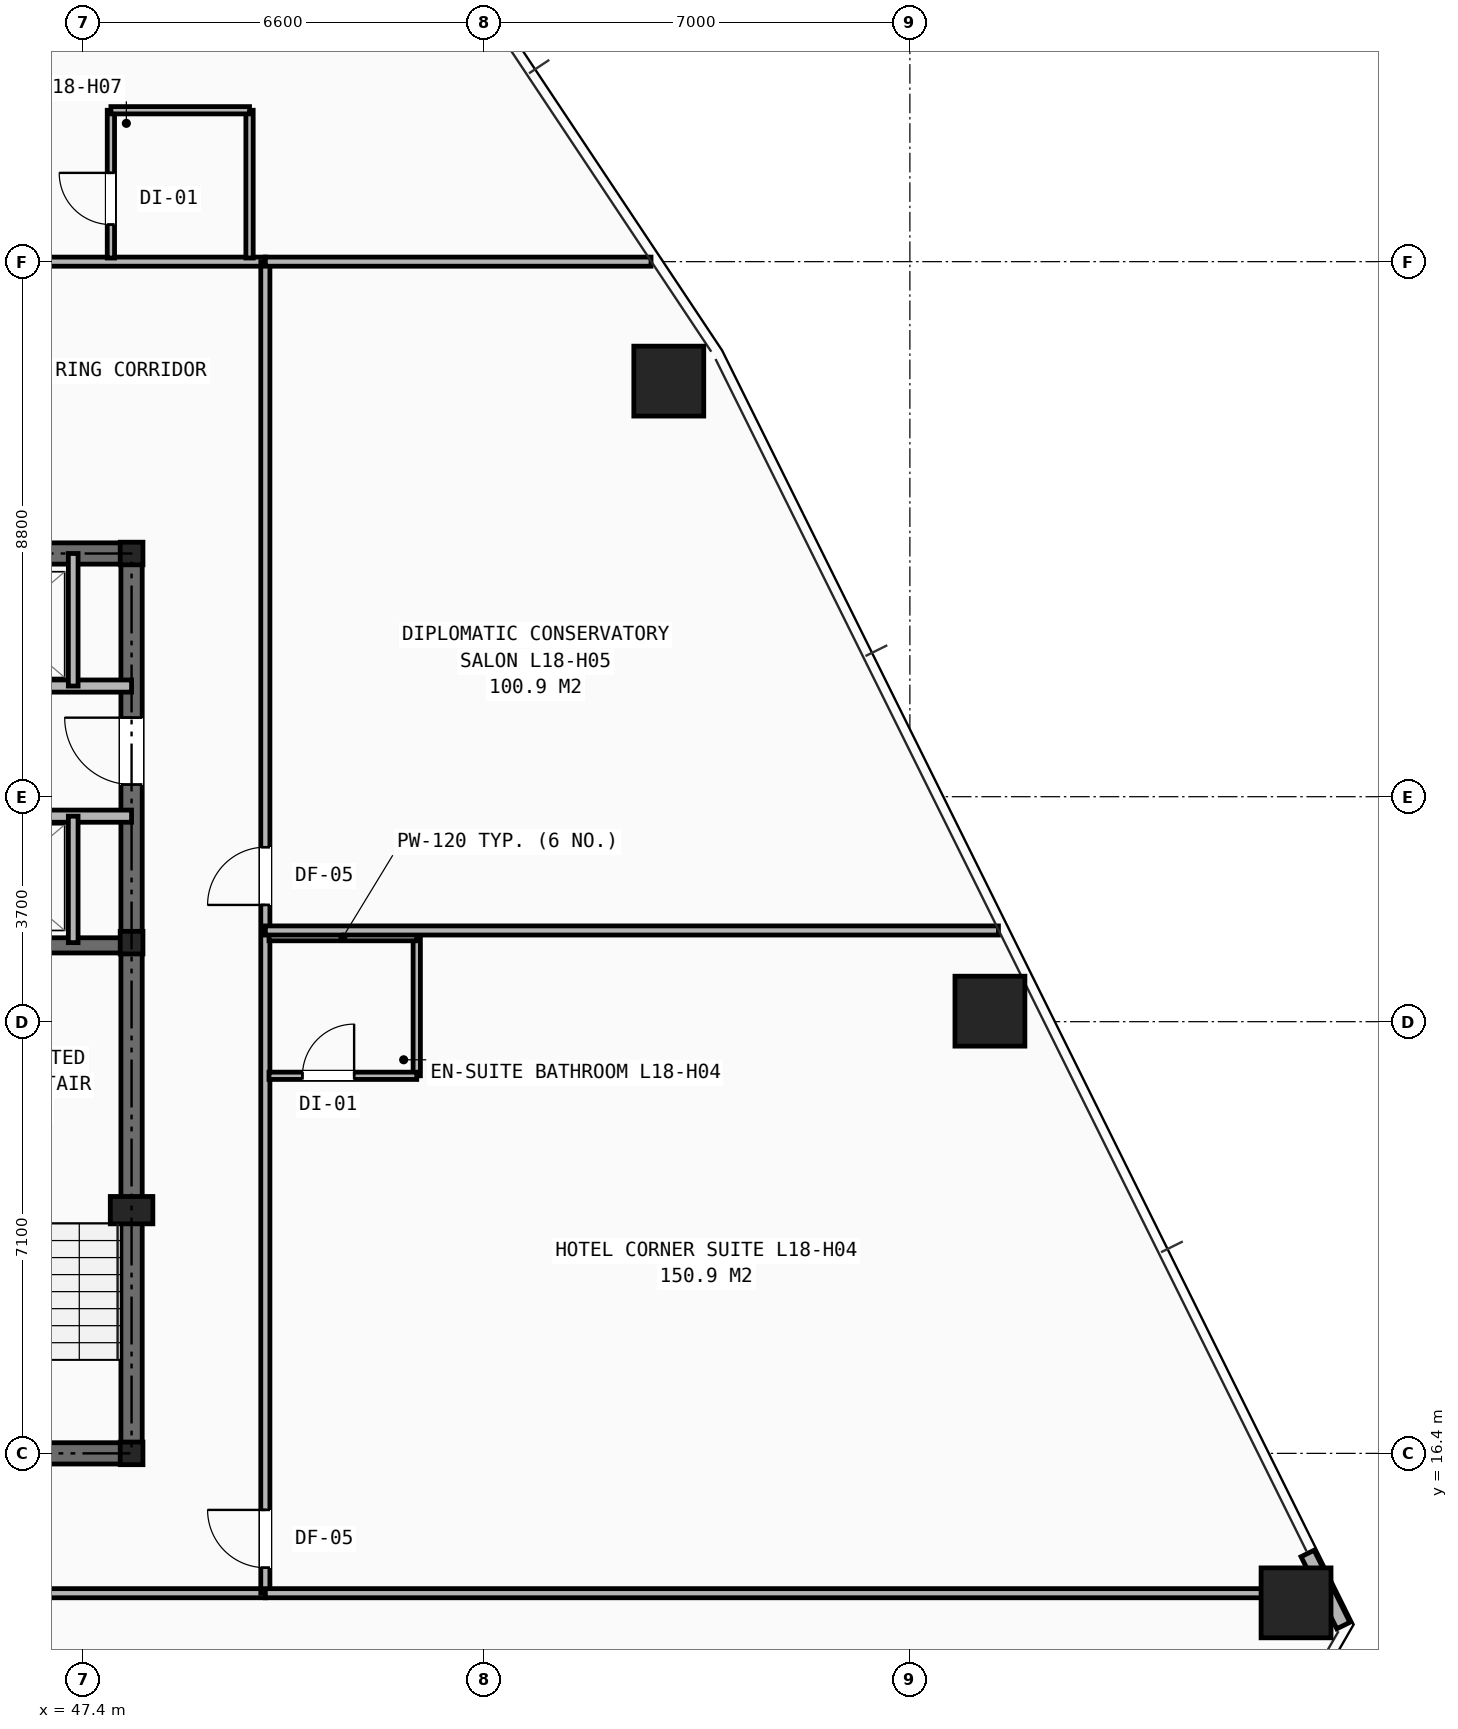
"""IFC4 building model, lengths in metres.
Left out: names, types, materials, properties, quantities, classifications, styles, units other than length and angle.
Written with IfcOpenShell. Run it as: python <this file> out.ifc"""

import sys

from ifc_helpers import new_model, si_unit, direction, frame, frame_2d, origin, origin_2d, place, context, subcontext, project, spatial, rectangle, hollow_rectangle, i_section, extrude, element, fill, save


model = new_model("IFC4")
c1 = context("Model", 3, precision=1e-05, world=origin(), true_north=direction((0.0, 1.0)))
c2 = subcontext(c1, "Body", "Model", "MODEL_VIEW")
j1 = project(units=[si_unit("LENGTHUNIT", "METRE"), si_unit("PLANEANGLEUNIT", "RADIAN")], contexts=[c1])
p1 = place(None, origin())
s1 = spatial("IfcSite", under=j1, at=p1, CompositionType="ELEMENT")
p2 = place(p1, origin())
s2 = spatial("IfcBuilding", under=s1, at=p2, CompositionType="ELEMENT")
p3 = place(p2, frame((0.0, 0.0, 65.6)))
s3 = spatial("IfcBuildingStorey", under=s2, at=p3, CompositionType="ELEMENT", Elevation=65.6)
for number, where, z_axis, x_axis in (
    (1, (48.2, 16.4, 0.0), (0.0, 0.0, 1.0), (1.0, 0.0, 0.0)),
    (2, (48.2, 24.8, 0.0), (0.0, 0.0, 1.0), (1.0, 0.0, 0.0)),
    (3, (48.2, 31.2, 0.0), (0.0, 0.0, 1.0), (1.0, 0.0, 0.0)),
):
    element("IfcColumn", number, at=place(p3, frame(where, z_axis=z_axis, x_axis=x_axis)), inside=s3, PredefinedType="COLUMN", context=c2, shape_type="SweptSolid", body=[
        extrude(i_section(OverallWidth=0.374, OverallDepth=0.372, WebThickness=0.016, FlangeThickness=0.026, at=origin_2d()), origin(), (0.0, 0.0, 1.0), 3.2),
    ])
p4 = place(p3, frame((48.2, 20.4, 0.0), z_axis=(0.0, 0.0, 1.0), x_axis=(1.0, 0.0, 0.0)))
e4 = element("IfcColumn", 4, at=p4, inside=s3, PredefinedType="PILASTER", context=c2, shape_type="SweptSolid", body=[
    extrude(rectangle(XDim=0.7, YDim=0.45, at=origin_2d()), origin(), (0.0, 0.0, 1.0), 3.2),
])
for number, where, z_axis, x_axis in (
    (5, (67.351, 13.941, 0.0), (0.0, 0.0, 1.0), (1.0, 0.0, 0.0)),
    (6, (62.316, 23.673, 0.0), (0.0, 0.0, 1.0), (1.0, 0.0, 0.0)),
    (7, (57.035, 34.035, 0.0), (0.0, 0.0, 1.0), (1.0, 0.0, 0.0)),
):
    element("IfcColumn", number, at=place(p3, frame(where, z_axis=z_axis, x_axis=x_axis)), inside=s3, PredefinedType="COLUMN", context=c2, shape_type="SweptSolid", body=[
        extrude(hollow_rectangle(XDim=1.15, YDim=1.15, WallThickness=0.075, at=origin_2d()), origin(), (0.0, 0.0, 1.0), 3.2),
    ])
p5 = place(p3, frame((68.129, 13.568, 0.0), z_axis=(0.0, 0.0, 1.0), x_axis=(-0.444037765369, 0.896008070793, 0.0)))
e8 = element("IfcWall", 8, at=p5, inside=s3, PredefinedType="SHEAR", context=c2, shape_type="SweptSolid", body=[
    extrude(rectangle(XDim=1.323, YDim=0.24, at=frame_2d((0.662, 0.0))), origin(), (0.0, 0.0, 1.0), 2.183),
])
p6 = place(p3, frame((31.8, 16.4, 0.0), z_axis=(0.0, 0.0, 1.0), x_axis=(1.0, 0.0, 0.0)))
e9 = element("IfcWall", 9, at=p6, inside=s3, PredefinedType="SHEAR", context=c2, shape_type="SweptSolid", body=[
    extrude(rectangle(XDim=16.4, YDim=0.35, at=frame_2d((8.2, 0.0))), origin(), (0.0, 0.0, 1.0), 2.9),
])
p7 = place(p6, frame((7.75, 0.0, 0.0)))
e10 = element("IfcOpeningElement", 10, at=p7, cuts=e9, PredefinedType="OPENING", context=c2, shape_type="SweptSolid", body=[
    extrude(rectangle(XDim=0.9, YDim=2.1, at=frame_2d((0.45, 1.05))), frame((0.0, 0.185, 0.0), z_axis=(0.0, -1.0, 0.0), x_axis=(1.0, 0.0, 0.0)), (0.0, 0.0, 1.0), 0.37),
])
p8 = place(p6, frame((4.2, 0.0, 0.0)))
e11 = element("IfcOpeningElement", 11, at=p8, cuts=e9, PredefinedType="OPENING", context=c2, shape_type="SweptSolid", body=[
    extrude(rectangle(XDim=0.95, YDim=2.1, at=frame_2d((0.475, 1.05))), frame((0.0, 0.185, 0.0), z_axis=(0.0, -1.0, 0.0), x_axis=(1.0, 0.0, 0.0)), (0.0, 0.0, 1.0), 0.37),
])
p9 = place(p6, frame((10.6, 0.0, 0.0)))
e12 = element("IfcOpeningElement", 12, at=p9, cuts=e9, PredefinedType="OPENING", context=c2, shape_type="SweptSolid", body=[
    extrude(rectangle(XDim=0.95, YDim=2.1, at=frame_2d((0.475, 1.05))), frame((0.0, 0.185, 0.0), z_axis=(0.0, -1.0, 0.0), x_axis=(1.0, 0.0, 0.0)), (0.0, 0.0, 1.0), 0.37),
])
p10 = place(p3, frame((31.8, 31.2, 0.0), z_axis=(0.0, 0.0, 1.0), x_axis=(1.0, 0.0, 0.0)))
e13 = element("IfcWall", 13, at=p10, inside=s3, PredefinedType="SHEAR", context=c2, shape_type="SweptSolid", body=[
    extrude(rectangle(XDim=16.4, YDim=0.35, at=frame_2d((8.2, 0.0))), origin(), (0.0, 0.0, 1.0), 2.9),
])
p11 = place(p3, frame((48.2, 16.4, 0.0), z_axis=(0.0, 0.0, 1.0), x_axis=(0.0, 1.0, 0.0)))
e14 = element("IfcWall", 14, at=p11, inside=s3, PredefinedType="SHEAR", context=c2, shape_type="SweptSolid", body=[
    extrude(rectangle(XDim=14.8, YDim=0.35, at=frame_2d((7.4, 0.0))), origin(), (0.0, 0.0, 1.0), 2.9),
])
p12 = place(p11, frame((11.0, 0.0, 0.0)))
e15 = element("IfcOpeningElement", 15, at=p12, cuts=e14, PredefinedType="OPENING", context=c2, shape_type="SweptSolid", body=[
    extrude(rectangle(XDim=1.1, YDim=2.15, at=frame_2d((0.55, 1.075))), frame((0.0, 0.185, 0.0), z_axis=(0.0, -1.0, 0.0), x_axis=(1.0, 0.0, 0.0)), (0.0, 0.0, 1.0), 0.37),
])
p13 = place(p3, frame((44.955, 24.755, 0.0), z_axis=(0.0, 0.0, 1.0), x_axis=(1.0, 0.0, 0.0)))
e16 = element("IfcWall", 16, at=p13, inside=s3, PredefinedType="SHEAR", context=c2, shape_type="SweptSolid", body=[
    extrude(rectangle(XDim=3.245, YDim=0.25, at=frame_2d((1.623, 0.0))), origin(), (0.0, 0.0, 1.0), 2.9),
])
p14 = place(p3, frame((31.8, 29.02, 0.0), z_axis=(0.0, 0.0, 1.0), x_axis=(1.0, 0.0, 0.0)))
e17 = element("IfcWall", 17, at=p14, inside=s3, PredefinedType="SOLIDWALL", context=c2, shape_type="SweptSolid", body=[
    extrude(rectangle(XDim=16.4, YDim=0.2, at=frame_2d((8.2, 0.0))), origin(), (0.0, 0.0, 1.0), 2.351),
])
p15 = place(p14, frame((0.55, 0.0, 0.0)))
e18 = element("IfcOpeningElement", 18, at=p15, cuts=e17, PredefinedType="OPENING", context=c2, shape_type="SweptSolid", body=[
    extrude(rectangle(XDim=0.85, YDim=2.05, at=frame_2d((0.425, 1.025))), frame((0.0, 0.11, 0.0), z_axis=(0.0, -1.0, 0.0), x_axis=(1.0, 0.0, 0.0)), (0.0, 0.0, 1.0), 0.22),
])
p16 = place(p14, frame((2.55, 0.0, 0.0)))
e19 = element("IfcOpeningElement", 19, at=p16, cuts=e17, PredefinedType="OPENING", context=c2, shape_type="SweptSolid", body=[
    extrude(rectangle(XDim=1.1, YDim=2.15, at=frame_2d((0.55, 1.075))), frame((0.0, 0.11, 0.0), z_axis=(0.0, -1.0, 0.0), x_axis=(1.0, 0.0, 0.0)), (0.0, 0.0, 1.0), 0.22),
])
p17 = place(p14, frame((4.71, 0.0, 0.0)))
e20 = element("IfcOpeningElement", 20, at=p17, cuts=e17, PredefinedType="OPENING", context=c2, shape_type="SweptSolid", body=[
    extrude(rectangle(XDim=1.1, YDim=2.15, at=frame_2d((0.55, 1.075))), frame((0.0, 0.11, 0.0), z_axis=(0.0, -1.0, 0.0), x_axis=(1.0, 0.0, 0.0)), (0.0, 0.0, 1.0), 0.22),
])
p18 = place(p14, frame((6.87, 0.0, 0.0)))
e21 = element("IfcOpeningElement", 21, at=p18, cuts=e17, PredefinedType="OPENING", context=c2, shape_type="SweptSolid", body=[
    extrude(rectangle(XDim=1.1, YDim=2.15, at=frame_2d((0.55, 1.075))), frame((0.0, 0.11, 0.0), z_axis=(0.0, -1.0, 0.0), x_axis=(1.0, 0.0, 0.0)), (0.0, 0.0, 1.0), 0.22),
])
p19 = place(p14, frame((9.03, 0.0, 0.0)))
e22 = element("IfcOpeningElement", 22, at=p19, cuts=e17, PredefinedType="OPENING", context=c2, shape_type="SweptSolid", body=[
    extrude(rectangle(XDim=1.1, YDim=2.15, at=frame_2d((0.55, 1.075))), frame((0.0, 0.11, 0.0), z_axis=(0.0, -1.0, 0.0), x_axis=(1.0, 0.0, 0.0)), (0.0, 0.0, 1.0), 0.22),
])
p20 = place(p3, frame((33.82, 26.88, 0.0), z_axis=(0.0, 0.0, 1.0), x_axis=(1.0, 0.0, 0.0)))
e23 = element("IfcWall", 23, at=p20, inside=s3, PredefinedType="SOLIDWALL", context=c2, shape_type="SweptSolid", body=[
    extrude(rectangle(XDim=14.38, YDim=0.2, at=frame_2d((7.19, 0.0))), origin(), (0.0, 0.0, 1.0), 2.351),
])
p21 = place(p3, frame((47.24, 29.02, 0.0), z_axis=(0.0, 0.0, 1.0), x_axis=(0.0, 1.0, 0.0)))
e24 = element("IfcWall", 24, at=p21, inside=s3, PredefinedType="SOLIDWALL", context=c2, shape_type="SweptSolid", body=[
    extrude(rectangle(XDim=2.18, YDim=0.16, at=frame_2d((1.09, 0.0))), origin(), (0.0, 0.0, 1.0), 2.351),
])
p22 = place(p3, frame((47.24, 24.8, 0.0), z_axis=(0.0, 0.0, 1.0), x_axis=(0.0, 1.0, 0.0)))
e25 = element("IfcWall", 25, at=p22, inside=s3, PredefinedType="SOLIDWALL", context=c2, shape_type="SweptSolid", body=[
    extrude(rectangle(XDim=2.08, YDim=0.16, at=frame_2d((1.04, 0.0))), origin(), (0.0, 0.0, 1.0), 2.9),
])
p23 = place(p3, frame((29.6, 14.1, 0.0), z_axis=(0.0, 0.0, 1.0), x_axis=(1.0, 0.0, 0.0)))
e26 = element("IfcWall", 26, at=p23, inside=s3, PredefinedType="PARTITIONING", context=c2, shape_type="SweptSolid", body=[
    extrude(rectangle(XDim=20.8, YDim=0.15, at=frame_2d((10.4, 0.0))), origin(), (0.0, 0.0, 1.0), 2.351),
])
p24 = place(p23, frame((0.57, 0.0, 0.0)))
e27 = element("IfcOpeningElement", 27, at=p24, cuts=e26, PredefinedType="OPENING", context=c2, shape_type="SweptSolid", body=[
    extrude(rectangle(XDim=0.95, YDim=2.1, at=frame_2d((0.475, 1.05))), frame((0.0, 0.085, 0.0), z_axis=(0.0, -1.0, 0.0), x_axis=(1.0, 0.0, 0.0)), (0.0, 0.0, 1.0), 0.17),
])
p25 = place(p23, frame((9.32, 0.0, 0.0)))
e28 = element("IfcOpeningElement", 28, at=p25, cuts=e26, PredefinedType="OPENING", context=c2, shape_type="SweptSolid", body=[
    extrude(rectangle(XDim=0.95, YDim=2.1, at=frame_2d((0.475, 1.05))), frame((0.0, 0.085, 0.0), z_axis=(0.0, -1.0, 0.0), x_axis=(1.0, 0.0, 0.0)), (0.0, 0.0, 1.0), 0.17),
])
p26 = place(p3, frame((40.75, 36.0, 0.0), z_axis=(0.0, 0.0, 1.0), x_axis=(1.0, 0.0, 0.0)))
e29 = element("IfcWall", 29, at=p26, inside=s3, PredefinedType="PARTITIONING", context=c2, shape_type="SweptSolid", body=[
    extrude(rectangle(XDim=9.65, YDim=0.15, at=frame_2d((4.825, 0.0))), origin(), (0.0, 0.0, 1.0), 2.433),
])
p27 = place(p26, frame((0.17, 0.0, 0.0)))
e30 = element("IfcOpeningElement", 30, at=p27, cuts=e29, PredefinedType="OPENING", context=c2, shape_type="SweptSolid", body=[
    extrude(rectangle(XDim=0.95, YDim=2.1, at=frame_2d((0.475, 1.05))), frame((0.0, 0.085, 0.0), z_axis=(0.0, -1.0, 0.0), x_axis=(1.0, 0.0, 0.0)), (0.0, 0.0, 1.0), 0.17),
])
p28 = place(p3, frame((50.4, 14.1, 0.0), z_axis=(0.0, 0.0, 1.0), x_axis=(0.0, 1.0, 0.0)))
e31 = element("IfcWall", 31, at=p28, inside=s3, PredefinedType="PARTITIONING", context=c2, shape_type="SweptSolid", body=[
    extrude(rectangle(XDim=21.9, YDim=0.15, at=frame_2d((10.95, 0.0))), origin(), (0.0, 0.0, 1.0), 2.351),
])
p29 = place(p28, frame((0.42, 0.0, 0.0)))
e32 = element("IfcOpeningElement", 32, at=p29, cuts=e31, PredefinedType="OPENING", context=c2, shape_type="SweptSolid", body=[
    extrude(rectangle(XDim=0.95, YDim=2.1, at=frame_2d((0.475, 1.05))), frame((0.0, 0.085, 0.0), z_axis=(0.0, -1.0, 0.0), x_axis=(1.0, 0.0, 0.0)), (0.0, 0.0, 1.0), 0.17),
])
p30 = place(p28, frame((11.32, 0.0, 0.0)))
e33 = element("IfcOpeningElement", 33, at=p30, cuts=e31, PredefinedType="OPENING", context=c2, shape_type="SweptSolid", body=[
    extrude(rectangle(XDim=0.95, YDim=2.1, at=frame_2d((0.475, 1.05))), frame((0.0, 0.085, 0.0), z_axis=(0.0, -1.0, 0.0), x_axis=(1.0, 0.0, 0.0)), (0.0, 0.0, 1.0), 0.17),
])
p31 = place(p3, frame((50.4, 14.1, 0.0), z_axis=(0.0, 0.0, 1.0), x_axis=(1.0, 0.0, 0.0)))
e34 = element("IfcWall", 34, at=p31, inside=s3, PredefinedType="PARTITIONING", context=c2, shape_type="SweptSolid", body=[
    extrude(rectangle(XDim=17.459, YDim=0.15, at=frame_2d((8.73, 0.0))), origin(), (0.0, 0.0, 1.0), 2.188),
])
p32 = place(p3, frame((50.4, 36.0, 0.0), z_axis=(0.0, 0.0, 1.0), x_axis=(1.0, 0.0, 0.0)))
e35 = element("IfcWall", 35, at=p32, inside=s3, PredefinedType="PARTITIONING", context=c2, shape_type="SweptSolid", body=[
    extrude(rectangle(XDim=6.343, YDim=0.15, at=frame_2d((3.171, 0.0))), origin(), (0.0, 0.0, 1.0), 2.188),
])
p33 = place(p3, frame((52.89, 22.61, 0.0), z_axis=(0.0, 0.0, 1.0), x_axis=(0.0, 1.0, 0.0)))
e36 = element("IfcWall", 36, at=p33, inside=s3, PredefinedType="PARTITIONING", context=c2, shape_type="SweptSolid", body=[
    extrude(rectangle(XDim=2.28, YDim=0.12, at=frame_2d((1.14, 0.0))), origin(), (0.0, 0.0, 1.0), 2.9),
])
p34 = place(p3, frame((50.46, 22.61, 0.0), z_axis=(0.0, 0.0, 1.0), x_axis=(1.0, 0.0, 0.0)))
e37 = element("IfcWall", 37, at=p34, inside=s3, PredefinedType="PARTITIONING", context=c2, shape_type="SweptSolid", body=[
    extrude(rectangle(XDim=2.43, YDim=0.12, at=frame_2d((1.215, 0.0))), origin(), (0.0, 0.0, 1.0), 2.9),
])
p35 = place(p34, frame((0.55, 0.0, 0.0)))
e38 = element("IfcOpeningElement", 38, at=p35, cuts=e37, PredefinedType="OPENING", context=c2, shape_type="SweptSolid", body=[
    extrude(rectangle(XDim=0.85, YDim=2.05, at=frame_2d((0.425, 1.025))), frame((0.0, 0.07, 0.0), z_axis=(0.0, -1.0, 0.0), x_axis=(1.0, 0.0, 0.0)), (0.0, 0.0, 1.0), 0.14),
])
p36 = place(p3, frame((50.46, 24.89, 0.0), z_axis=(0.0, 0.0, 1.0), x_axis=(1.0, 0.0, 0.0)))
e39 = element("IfcWall", 39, at=p36, inside=s3, PredefinedType="PARTITIONING", context=c2, shape_type="SweptSolid", body=[
    extrude(rectangle(XDim=2.43, YDim=0.12, at=frame_2d((1.215, 0.0))), origin(), (0.0, 0.0, 1.0), 2.9),
])
p37 = place(p3, frame((50.4, 25.0, 0.0), z_axis=(0.0, 0.0, 1.0), x_axis=(1.0, 0.0, 0.0)))
e40 = element("IfcWall", 40, at=p37, inside=s3, PredefinedType="PARTITIONING", context=c2, shape_type="SweptSolid", body=[
    extrude(rectangle(XDim=12.056, YDim=0.15, at=frame_2d((6.028, 0.0))), origin(), (0.0, 0.0, 1.0), 2.188),
])
p38 = place(p3, frame((47.86, 36.06, 0.0), z_axis=(0.0, 0.0, 1.0), x_axis=(0.0, 1.0, 0.0)))
e41 = element("IfcWall", 41, at=p38, inside=s3, PredefinedType="PARTITIONING", context=c2, shape_type="SweptSolid", body=[
    extrude(rectangle(XDim=2.43, YDim=0.12, at=frame_2d((1.215, 0.0))), origin(), (0.0, 0.0, 1.0), 2.9),
])
p39 = place(p38, frame((0.55, 0.0, 0.0)))
e42 = element("IfcOpeningElement", 42, at=p39, cuts=e41, PredefinedType="OPENING", context=c2, shape_type="SweptSolid", body=[
    extrude(rectangle(XDim=0.85, YDim=2.05, at=frame_2d((0.425, 1.025))), frame((0.0, 0.07, 0.0), z_axis=(0.0, -1.0, 0.0), x_axis=(1.0, 0.0, 0.0)), (0.0, 0.0, 1.0), 0.14),
])
p40 = place(p3, frame((50.14, 36.06, 0.0), z_axis=(0.0, 0.0, 1.0), x_axis=(0.0, 1.0, 0.0)))
e43 = element("IfcWall", 43, at=p40, inside=s3, PredefinedType="PARTITIONING", context=c2, shape_type="SweptSolid", body=[
    extrude(rectangle(XDim=2.43, YDim=0.12, at=frame_2d((1.215, 0.0))), origin(), (0.0, 0.0, 1.0), 2.433),
])
p41 = place(p3, frame((47.86, 38.49, 0.0), z_axis=(0.0, 0.0, 1.0), x_axis=(1.0, 0.0, 0.0)))
e44 = element("IfcWall", 44, at=p41, inside=s3, PredefinedType="PARTITIONING", context=c2, shape_type="SweptSolid", body=[
    extrude(rectangle(XDim=2.28, YDim=0.12, at=frame_2d((1.14, 0.0))), origin(), (0.0, 0.0, 1.0), 2.433),
])
p42 = place(p12, origin())
e45 = element("IfcDoor", 45, at=p42, inside=s3, OperationType="SINGLE_SWING_RIGHT", PredefinedType="DOOR", context=c2, shape_type="SweptSolid", body=[
    extrude(rectangle(XDim=1.1, YDim=2.15, at=frame_2d((0.55, 1.075))), frame((0.0, 0.025, 0.0), z_axis=(0.0, -1.0, 0.0), x_axis=(1.0, 0.0, 0.0)), (0.0, 0.0, 1.0), 0.05),
])
fill(e15, e45)
p43 = place(p29, origin())
e46 = element("IfcDoor", 46, at=p43, inside=s3, OperationType="SINGLE_SWING_RIGHT", PredefinedType="DOOR", context=c2, shape_type="SweptSolid", body=[
    extrude(rectangle(XDim=0.95, YDim=2.1, at=frame_2d((0.475, 1.05))), frame((0.0, 0.025, 0.0), z_axis=(0.0, -1.0, 0.0), x_axis=(1.0, 0.0, 0.0)), (0.0, 0.0, 1.0), 0.05),
])
fill(e32, e46)
p44 = place(p35, origin())
e47 = element("IfcDoor", 47, at=p44, inside=s3, OperationType="SINGLE_SWING_RIGHT", PredefinedType="DOOR", context=c2, shape_type="SweptSolid", body=[
    extrude(rectangle(XDim=0.85, YDim=2.05, at=frame_2d((0.425, 1.025))), frame((0.0, 0.025, 0.0), z_axis=(0.0, -1.0, 0.0), x_axis=(1.0, 0.0, 0.0)), (0.0, 0.0, 1.0), 0.05),
])
fill(e38, e47)
p45 = place(p30, origin())
e48 = element("IfcDoor", 48, at=p45, inside=s3, OperationType="SINGLE_SWING_LEFT", PredefinedType="DOOR", context=c2, shape_type="SweptSolid", body=[
    extrude(rectangle(XDim=0.95, YDim=2.1, at=frame_2d((0.475, 1.05))), frame((0.0, 0.025, 0.0), z_axis=(0.0, -1.0, 0.0), x_axis=(1.0, 0.0, 0.0)), (0.0, 0.0, 1.0), 0.05),
])
fill(e33, e48)
p46 = place(p39, origin())
e49 = element("IfcDoor", 49, at=p46, inside=s3, OperationType="SINGLE_SWING_RIGHT", PredefinedType="DOOR", context=c2, shape_type="SweptSolid", body=[
    extrude(rectangle(XDim=0.85, YDim=2.05, at=frame_2d((0.425, 1.025))), frame((0.0, 0.025, 0.0), z_axis=(0.0, -1.0, 0.0), x_axis=(1.0, 0.0, 0.0)), (0.0, 0.0, 1.0), 0.05),
])
fill(e42, e49)
save(model, sys.argv[1])
